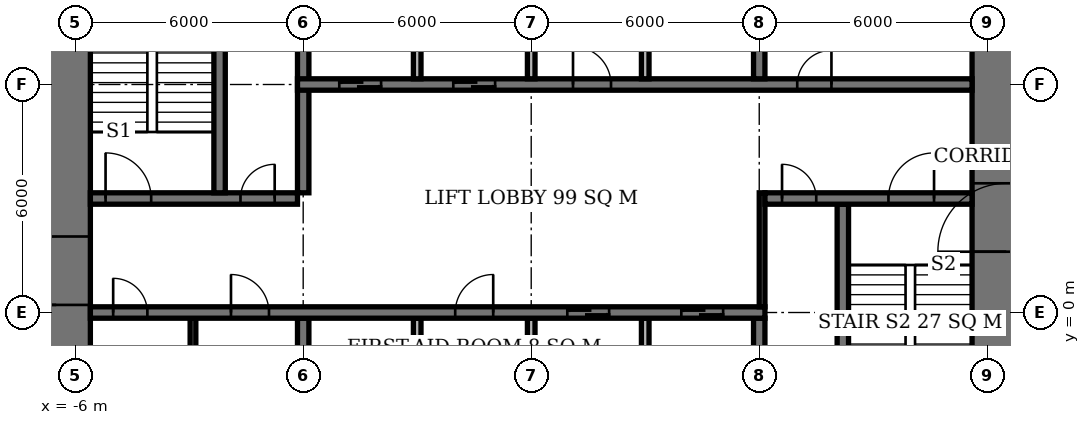
"""IFC4 building model, lengths in metres.
Left out: names, types, materials, properties, quantities, classifications, styles, units other than length and angle.
Written with IfcOpenShell. Run it as: python <this file> out.ifc"""

import sys

from ifc_helpers import new_model, si_unit, direction, frame, frame_2d, origin, place, context, subcontext, project, spatial, rectangle, extrude, element, fill, save


model = new_model("IFC4")
c1 = context("Model", 3, precision=1e-05, world=origin(), true_north=direction((0.0, 1.0)))
c2 = subcontext(c1, "Body", "Model", "MODEL_VIEW")
j1 = project(units=[si_unit("LENGTHUNIT", "METRE"), si_unit("PLANEANGLEUNIT", "RADIAN")], contexts=[c1])
p1 = place(None, origin())
s1 = spatial("IfcSite", under=j1, at=p1, CompositionType="ELEMENT")
p2 = place(p1, origin())
s2 = spatial("IfcBuilding", under=s1, at=p2, CompositionType="ELEMENT")
p3 = place(p2, frame((0.0, 0.0, 204.5)))
s3 = spatial("IfcBuildingStorey", under=s2, at=p3, CompositionType="ELEMENT", Elevation=204.5)
p4 = place(p3, frame((-6.5, -7.6, 0.0), z_axis=(0.0, 0.0, 1.0), x_axis=(0.0, 1.0, 0.0)))
e1 = element("IfcWall", 1, at=p4, inside=s3, PredefinedType="SHEAR", context=c2, shape_type="SweptSolid", body=[
    extrude(rectangle(XDim=21.2, YDim=1.8, at=frame_2d((10.6, 0.0))), origin(), (0.0, 0.0, 1.0), 3.9),
])
p5 = place(p4, frame((7.8, 0.0, 0.0)))
e2 = element("IfcOpeningElement", 2, at=p5, cuts=e1, PredefinedType="OPENING", context=c2, shape_type="SweptSolid", body=[
    extrude(rectangle(XDim=1.8, YDim=2.4, at=frame_2d((0.9, 1.2))), frame((0.0, 0.91, 0.0), z_axis=(0.0, -1.0, 0.0), x_axis=(1.0, 0.0, 0.0)), (0.0, 0.0, 1.0), 1.82),
])
p6 = place(p3, frame((18.5, -7.6, 0.0), z_axis=(0.0, 0.0, 1.0), x_axis=(0.0, 1.0, 0.0)))
e3 = element("IfcWall", 3, at=p6, inside=s3, PredefinedType="SHEAR", context=c2, shape_type="SweptSolid", body=[
    extrude(rectangle(XDim=21.2, YDim=1.8, at=frame_2d((10.6, 0.0))), origin(), (0.0, 0.0, 1.0), 3.9),
])
p7 = place(p6, frame((9.2, 0.0, 0.0)))
e4 = element("IfcOpeningElement", 4, at=p7, cuts=e3, PredefinedType="OPENING", context=c2, shape_type="SweptSolid", body=[
    extrude(rectangle(XDim=1.8, YDim=2.4, at=frame_2d((0.9, 1.2))), frame((0.0, 0.91, 0.0), z_axis=(0.0, -1.0, 0.0), x_axis=(1.0, 0.0, 0.0)), (0.0, 0.0, 1.0), 1.82),
])
p8 = place(p3, frame((-5.6, 0.0, 0.0), z_axis=(0.0, 0.0, 1.0), x_axis=(1.0, 0.0, 0.0)))
e5 = element("IfcWall", 5, at=p8, inside=s3, PredefinedType="SHEAR", context=c2, shape_type="SweptSolid", body=[
    extrude(rectangle(XDim=17.75, YDim=0.3, at=frame_2d((8.875, 0.0))), origin(), (0.0, 0.0, 1.0), 3.9),
])
p9 = place(p8, frame((0.6, 0.0, 0.0)))
e6 = element("IfcOpeningElement", 6, at=p9, cuts=e5, PredefinedType="OPENING", context=c2, shape_type="SweptSolid", body=[
    extrude(rectangle(XDim=0.9, YDim=2.1, at=frame_2d((0.45, 1.05))), frame((0.0, 0.16, 0.0), z_axis=(0.0, -1.0, 0.0), x_axis=(1.0, 0.0, 0.0)), (0.0, 0.0, 1.0), 0.32),
])
p10 = place(p8, frame((3.7, 0.0, 0.0)))
e7 = element("IfcOpeningElement", 7, at=p10, cuts=e5, PredefinedType="OPENING", context=c2, shape_type="SweptSolid", body=[
    extrude(rectangle(XDim=1.0, YDim=2.1, at=frame_2d((0.5, 1.05))), frame((0.0, 0.16, 0.0), z_axis=(0.0, -1.0, 0.0), x_axis=(1.0, 0.0, 0.0)), (0.0, 0.0, 1.0), 0.32),
])
p11 = place(p8, frame((9.6, 0.0, 0.0)))
e8 = element("IfcOpeningElement", 8, at=p11, cuts=e5, PredefinedType="OPENING", context=c2, shape_type="SweptSolid", body=[
    extrude(rectangle(XDim=1.0, YDim=2.1, at=frame_2d((0.5, 1.05))), frame((0.0, 0.16, 0.0), z_axis=(0.0, -1.0, 0.0), x_axis=(1.0, 0.0, 0.0)), (0.0, 0.0, 1.0), 0.32),
])
p12 = place(p8, frame((12.55, 0.0, 0.0)))
e9 = element("IfcOpeningElement", 9, at=p12, cuts=e5, PredefinedType="OPENING", context=c2, shape_type="SweptSolid", body=[
    extrude(rectangle(XDim=1.1, YDim=2.1, at=frame_2d((0.55, 1.05))), frame((0.0, 0.16, 0.0), z_axis=(0.0, -1.0, 0.0), x_axis=(1.0, 0.0, 0.0)), (0.0, 0.0, 1.0), 0.32),
])
p13 = place(p8, frame((15.55, 0.0, 0.0)))
e10 = element("IfcOpeningElement", 10, at=p13, cuts=e5, PredefinedType="OPENING", context=c2, shape_type="SweptSolid", body=[
    extrude(rectangle(XDim=1.1, YDim=2.1, at=frame_2d((0.55, 1.05))), frame((0.0, 0.16, 0.0), z_axis=(0.0, -1.0, 0.0), x_axis=(1.0, 0.0, 0.0)), (0.0, 0.0, 1.0), 0.32),
])
p14 = place(p3, frame((-5.6, 3.0, 0.0), z_axis=(0.0, 0.0, 1.0), x_axis=(1.0, 0.0, 0.0)))
e11 = element("IfcWall", 11, at=p14, inside=s3, PredefinedType="SHEAR", context=c2, shape_type="SweptSolid", body=[
    extrude(rectangle(XDim=5.45, YDim=0.3, at=frame_2d((2.725, 0.0))), origin(), (0.0, 0.0, 1.0), 3.9),
])
p15 = place(p14, frame((0.4, 0.0, 0.0)))
e12 = element("IfcOpeningElement", 12, at=p15, cuts=e11, PredefinedType="OPENING", context=c2, shape_type="SweptSolid", body=[
    extrude(rectangle(XDim=1.2, YDim=2.1, at=frame_2d((0.6, 1.05))), frame((0.0, 0.16, 0.0), z_axis=(0.0, -1.0, 0.0), x_axis=(1.0, 0.0, 0.0)), (0.0, 0.0, 1.0), 0.32),
])
p16 = place(p14, frame((3.95, 0.0, 0.0)))
e13 = element("IfcOpeningElement", 13, at=p16, cuts=e11, PredefinedType="OPENING", context=c2, shape_type="SweptSolid", body=[
    extrude(rectangle(XDim=0.9, YDim=2.1, at=frame_2d((0.45, 1.05))), frame((0.0, 0.16, 0.0), z_axis=(0.0, -1.0, 0.0), x_axis=(1.0, 0.0, 0.0)), (0.0, 0.0, 1.0), 0.32),
])
p17 = place(p3, frame((12.15, 3.0, 0.0), z_axis=(0.0, 0.0, 1.0), x_axis=(1.0, 0.0, 0.0)))
e14 = element("IfcWall", 14, at=p17, inside=s3, PredefinedType="SHEAR", context=c2, shape_type="SweptSolid", body=[
    extrude(rectangle(XDim=5.45, YDim=0.3, at=frame_2d((2.725, 0.0))), origin(), (0.0, 0.0, 1.0), 3.9),
])
p18 = place(p17, frame((3.25, 0.0, 0.0)))
e15 = element("IfcOpeningElement", 15, at=p18, cuts=e14, PredefinedType="OPENING", context=c2, shape_type="SweptSolid", body=[
    extrude(rectangle(XDim=1.2, YDim=2.1, at=frame_2d((0.6, 1.05))), frame((0.0, 0.16, 0.0), z_axis=(0.0, -1.0, 0.0), x_axis=(1.0, 0.0, 0.0)), (0.0, 0.0, 1.0), 0.32),
])
p19 = place(p17, frame((0.45, 0.0, 0.0)))
e16 = element("IfcOpeningElement", 16, at=p19, cuts=e14, PredefinedType="OPENING", context=c2, shape_type="SweptSolid", body=[
    extrude(rectangle(XDim=0.9, YDim=2.1, at=frame_2d((0.45, 1.05))), frame((0.0, 0.16, 0.0), z_axis=(0.0, -1.0, 0.0), x_axis=(1.0, 0.0, 0.0)), (0.0, 0.0, 1.0), 0.32),
])
p20 = place(p3, frame((-0.15, 6.0, 0.0), z_axis=(0.0, 0.0, 1.0), x_axis=(1.0, 0.0, 0.0)))
e17 = element("IfcWall", 17, at=p20, inside=s3, PredefinedType="SHEAR", context=c2, shape_type="SweptSolid", body=[
    extrude(rectangle(XDim=17.75, YDim=0.3, at=frame_2d((8.875, 0.0))), origin(), (0.0, 0.0, 1.0), 3.9),
])
p21 = place(p20, frame((13.15, 0.0, 0.0)))
e18 = element("IfcOpeningElement", 18, at=p21, cuts=e17, PredefinedType="OPENING", context=c2, shape_type="SweptSolid", body=[
    extrude(rectangle(XDim=0.9, YDim=2.1, at=frame_2d((0.45, 1.05))), frame((0.0, 0.16, 0.0), z_axis=(0.0, -1.0, 0.0), x_axis=(1.0, 0.0, 0.0)), (0.0, 0.0, 1.0), 0.32),
])
p22 = place(p20, frame((7.25, 0.0, 0.0)))
e19 = element("IfcOpeningElement", 19, at=p22, cuts=e17, PredefinedType="OPENING", context=c2, shape_type="SweptSolid", body=[
    extrude(rectangle(XDim=1.0, YDim=2.1, at=frame_2d((0.5, 1.05))), frame((0.0, 0.16, 0.0), z_axis=(0.0, -1.0, 0.0), x_axis=(1.0, 0.0, 0.0)), (0.0, 0.0, 1.0), 0.32),
])
p23 = place(p20, frame((1.1, 0.0, 0.0)))
e20 = element("IfcOpeningElement", 20, at=p23, cuts=e17, PredefinedType="OPENING", context=c2, shape_type="SweptSolid", body=[
    extrude(rectangle(XDim=1.1, YDim=2.1, at=frame_2d((0.55, 1.05))), frame((0.0, 0.16, 0.0), z_axis=(0.0, -1.0, 0.0), x_axis=(1.0, 0.0, 0.0)), (0.0, 0.0, 1.0), 0.32),
])
p24 = place(p20, frame((4.1, 0.0, 0.0)))
e21 = element("IfcOpeningElement", 21, at=p24, cuts=e17, PredefinedType="OPENING", context=c2, shape_type="SweptSolid", body=[
    extrude(rectangle(XDim=1.1, YDim=2.1, at=frame_2d((0.55, 1.05))), frame((0.0, 0.16, 0.0), z_axis=(0.0, -1.0, 0.0), x_axis=(1.0, 0.0, 0.0)), (0.0, 0.0, 1.0), 0.32),
])
p25 = place(p3, frame((0.0, -5.6, 0.0), z_axis=(0.0, 0.0, 1.0), x_axis=(0.0, 1.0, 0.0)))
e22 = element("IfcWall", 22, at=p25, inside=s3, PredefinedType="SHEAR", context=c2, shape_type="SweptSolid", body=[
    extrude(rectangle(XDim=5.45, YDim=0.3, at=frame_2d((2.725, 0.0))), origin(), (0.0, 0.0, 1.0), 3.9),
])
p26 = place(p3, frame((0.0, 3.15, 0.0), z_axis=(0.0, 0.0, 1.0), x_axis=(0.0, 1.0, 0.0)))
e23 = element("IfcWall", 23, at=p26, inside=s3, PredefinedType="SHEAR", context=c2, shape_type="SweptSolid", body=[
    extrude(rectangle(XDim=8.45, YDim=0.3, at=frame_2d((4.225, 0.0))), origin(), (0.0, 0.0, 1.0), 3.9),
])
for number, where, z_axis, x_axis in (
    (24, (12.0, -5.6, 0.0), (0.0, 0.0, 1.0), (0.0, 1.0, 0.0)),
    (25, (12.0, 6.15, 0.0), (0.0, 0.0, 1.0), (0.0, 1.0, 0.0)),
):
    element("IfcWall", number, at=place(p3, frame(where, z_axis=z_axis, x_axis=x_axis)), inside=s3, PredefinedType="SHEAR", context=c2, shape_type="SweptSolid", body=[
        extrude(rectangle(XDim=5.45, YDim=0.3, at=frame_2d((2.725, 0.0))), origin(), (0.0, 0.0, 1.0), 3.9),
    ])
for number, where, z_axis, x_axis in (
    (26, (-2.2, 3.15, 0.0), (0.0, 0.0, 1.0), (0.0, 1.0, 0.0)),
    (27, (14.2, -5.6, 0.0), (0.0, 0.0, 1.0), (0.0, 1.0, 0.0)),
):
    element("IfcWall", number, at=place(p3, frame(where, z_axis=z_axis, x_axis=x_axis)), inside=s3, PredefinedType="SHEAR", context=c2, shape_type="SweptSolid", body=[
        extrude(rectangle(XDim=8.45, YDim=0.3, at=frame_2d((4.225, 0.0))), origin(), (0.0, 0.0, 1.0), 3.9),
    ])
for number, where, z_axis, x_axis in (
    (28, (3.0, 6.15, 0.0), (0.0, 0.0, 1.0), (0.0, 1.0, 0.0)),
    (29, (6.0, 6.15, 0.0), (0.0, 0.0, 1.0), (0.0, 1.0, 0.0)),
    (30, (9.0, 6.15, 0.0), (0.0, 0.0, 1.0), (0.0, 1.0, 0.0)),
    (31, (3.0, -5.6, 0.0), (0.0, 0.0, 1.0), (0.0, 1.0, 0.0)),
    (32, (6.0, -5.6, 0.0), (0.0, 0.0, 1.0), (0.0, 1.0, 0.0)),
    (33, (9.0, -5.6, 0.0), (0.0, 0.0, 1.0), (0.0, 1.0, 0.0)),
):
    element("IfcWall", number, at=place(p3, frame(where, z_axis=z_axis, x_axis=x_axis)), inside=s3, PredefinedType="SOLIDWALL", context=c2, shape_type="SweptSolid", body=[
        extrude(rectangle(XDim=5.45, YDim=0.2, at=frame_2d((2.725, 0.0))), origin(), (0.0, 0.0, 1.0), 3.9),
    ])
p27 = place(p3, frame((-2.9, -5.6, 0.0), z_axis=(0.0, 0.0, 1.0), x_axis=(0.0, 1.0, 0.0)))
e34 = element("IfcWall", 34, at=p27, inside=s3, PredefinedType="PLUMBINGWALL", context=c2, shape_type="SweptSolid", body=[
    extrude(rectangle(XDim=5.45, YDim=0.15, at=frame_2d((2.725, 0.0))), origin(), (0.0, 0.0, 1.0), 3.65),
])
p28 = place(p3, frame((12.075, 0.15, 0.0), z_axis=(0.0, 0.0, 1.0), x_axis=(0.0, 1.0, 0.0)))
e35 = element("IfcWall", 35, at=p28, inside=s3, PredefinedType="PARTITIONING", context=c2, shape_type="SweptSolid", body=[
    extrude(rectangle(XDim=3.0, YDim=0.15, at=frame_2d((1.5, 0.0))), origin(), (0.0, 0.0, 1.0), 3.65),
])
p29 = place(p5, origin())
e36 = element("IfcDoor", 36, at=p29, inside=s3, OperationType="DOUBLE_DOOR_SINGLE_SWING", PredefinedType="DOOR", context=c2, shape_type="SweptSolid", body=[
    extrude(rectangle(XDim=1.8, YDim=2.4, at=frame_2d((0.9, 1.2))), frame((0.0, 0.025, 0.0), z_axis=(0.0, -1.0, 0.0), x_axis=(1.0, 0.0, 0.0)), (0.0, 0.0, 1.0), 0.05),
])
fill(e2, e36)
p30 = place(p7, origin())
e37 = element("IfcDoor", 37, at=p30, inside=s3, OperationType="DOUBLE_DOOR_SINGLE_SWING", PredefinedType="DOOR", context=c2, shape_type="SweptSolid", body=[
    extrude(rectangle(XDim=1.8, YDim=2.4, at=frame_2d((0.9, 1.2))), frame((0.0, 0.025, 0.0), z_axis=(0.0, -1.0, 0.0), x_axis=(1.0, 0.0, 0.0)), (0.0, 0.0, 1.0), 0.05),
])
fill(e4, e37)
p31 = place(p15, origin())
e38 = element("IfcDoor", 38, at=p31, inside=s3, OperationType="SINGLE_SWING_LEFT", PredefinedType="DOOR", context=c2, shape_type="SweptSolid", body=[
    extrude(rectangle(XDim=1.2, YDim=2.1, at=frame_2d((0.6, 1.05))), frame((0.0, 0.025, 0.0), z_axis=(0.0, -1.0, 0.0), x_axis=(1.0, 0.0, 0.0)), (0.0, 0.0, 1.0), 0.05),
])
fill(e12, e38)
p32 = place(p16, origin())
e39 = element("IfcDoor", 39, at=p32, inside=s3, OperationType="SINGLE_SWING_RIGHT", PredefinedType="DOOR", context=c2, shape_type="SweptSolid", body=[
    extrude(rectangle(XDim=0.9, YDim=2.1, at=frame_2d((0.45, 1.05))), frame((0.0, 0.025, 0.0), z_axis=(0.0, -1.0, 0.0), x_axis=(1.0, 0.0, 0.0)), (0.0, 0.0, 1.0), 0.05),
])
fill(e13, e39)
p33 = place(p18, origin())
e40 = element("IfcDoor", 40, at=p33, inside=s3, OperationType="SINGLE_SWING_RIGHT", PredefinedType="DOOR", context=c2, shape_type="SweptSolid", body=[
    extrude(rectangle(XDim=1.2, YDim=2.1, at=frame_2d((0.6, 1.05))), frame((0.0, 0.025, 0.0), z_axis=(0.0, -1.0, 0.0), x_axis=(1.0, 0.0, 0.0)), (0.0, 0.0, 1.0), 0.05),
])
fill(e15, e40)
p34 = place(p19, origin())
e41 = element("IfcDoor", 41, at=p34, inside=s3, OperationType="SINGLE_SWING_LEFT", PredefinedType="DOOR", context=c2, shape_type="SweptSolid", body=[
    extrude(rectangle(XDim=0.9, YDim=2.1, at=frame_2d((0.45, 1.05))), frame((0.0, 0.025, 0.0), z_axis=(0.0, -1.0, 0.0), x_axis=(1.0, 0.0, 0.0)), (0.0, 0.0, 1.0), 0.05),
])
fill(e16, e41)
p35 = place(p9, origin())
e42 = element("IfcDoor", 42, at=p35, inside=s3, OperationType="SINGLE_SWING_LEFT", PredefinedType="DOOR", context=c2, shape_type="SweptSolid", body=[
    extrude(rectangle(XDim=0.9, YDim=2.1, at=frame_2d((0.45, 1.05))), frame((0.0, 0.025, 0.0), z_axis=(0.0, -1.0, 0.0), x_axis=(1.0, 0.0, 0.0)), (0.0, 0.0, 1.0), 0.05),
])
fill(e6, e42)
p36 = place(p10, origin())
e43 = element("IfcDoor", 43, at=p36, inside=s3, OperationType="SINGLE_SWING_LEFT", PredefinedType="DOOR", context=c2, shape_type="SweptSolid", body=[
    extrude(rectangle(XDim=1.0, YDim=2.1, at=frame_2d((0.5, 1.05))), frame((0.0, 0.025, 0.0), z_axis=(0.0, -1.0, 0.0), x_axis=(1.0, 0.0, 0.0)), (0.0, 0.0, 1.0), 0.05),
])
fill(e7, e43)
p37 = place(p21, origin())
e44 = element("IfcDoor", 44, at=p37, inside=s3, OperationType="SINGLE_SWING_RIGHT", PredefinedType="DOOR", context=c2, shape_type="SweptSolid", body=[
    extrude(rectangle(XDim=0.9, YDim=2.1, at=frame_2d((0.45, 1.05))), frame((0.0, 0.025, 0.0), z_axis=(0.0, -1.0, 0.0), x_axis=(1.0, 0.0, 0.0)), (0.0, 0.0, 1.0), 0.05),
])
fill(e18, e44)
p38 = place(p22, origin())
e45 = element("IfcDoor", 45, at=p38, inside=s3, OperationType="SINGLE_SWING_LEFT", PredefinedType="DOOR", context=c2, shape_type="SweptSolid", body=[
    extrude(rectangle(XDim=1.0, YDim=2.1, at=frame_2d((0.5, 1.05))), frame((0.0, 0.025, 0.0), z_axis=(0.0, -1.0, 0.0), x_axis=(1.0, 0.0, 0.0)), (0.0, 0.0, 1.0), 0.05),
])
fill(e19, e45)
p39 = place(p11, origin())
e46 = element("IfcDoor", 46, at=p39, inside=s3, OperationType="SINGLE_SWING_RIGHT", PredefinedType="DOOR", context=c2, shape_type="SweptSolid", body=[
    extrude(rectangle(XDim=1.0, YDim=2.1, at=frame_2d((0.5, 1.05))), frame((0.0, 0.025, 0.0), z_axis=(0.0, -1.0, 0.0), x_axis=(1.0, 0.0, 0.0)), (0.0, 0.0, 1.0), 0.05),
])
fill(e8, e46)
p40 = place(p23, origin())
e47 = element("IfcDoor", 47, at=p40, inside=s3, OperationType="DOUBLE_DOOR_SLIDING", PredefinedType="USERDEFINED", context=c2, shape_type="SweptSolid", body=[
    extrude(rectangle(XDim=1.1, YDim=2.1, at=frame_2d((0.55, 1.05))), frame((0.0, 0.025, 0.0), z_axis=(0.0, -1.0, 0.0), x_axis=(1.0, 0.0, 0.0)), (0.0, 0.0, 1.0), 0.05),
])
fill(e20, e47)
p41 = place(p24, origin())
e48 = element("IfcDoor", 48, at=p41, inside=s3, OperationType="DOUBLE_DOOR_SLIDING", PredefinedType="USERDEFINED", context=c2, shape_type="SweptSolid", body=[
    extrude(rectangle(XDim=1.1, YDim=2.1, at=frame_2d((0.55, 1.05))), frame((0.0, 0.025, 0.0), z_axis=(0.0, -1.0, 0.0), x_axis=(1.0, 0.0, 0.0)), (0.0, 0.0, 1.0), 0.05),
])
fill(e21, e48)
p42 = place(p12, origin())
e49 = element("IfcDoor", 49, at=p42, inside=s3, OperationType="DOUBLE_DOOR_SLIDING", PredefinedType="USERDEFINED", context=c2, shape_type="SweptSolid", body=[
    extrude(rectangle(XDim=1.1, YDim=2.1, at=frame_2d((0.55, 1.05))), frame((0.0, 0.025, 0.0), z_axis=(0.0, -1.0, 0.0), x_axis=(1.0, 0.0, 0.0)), (0.0, 0.0, 1.0), 0.05),
])
fill(e9, e49)
p43 = place(p13, origin())
e50 = element("IfcDoor", 50, at=p43, inside=s3, OperationType="DOUBLE_DOOR_SLIDING", PredefinedType="USERDEFINED", context=c2, shape_type="SweptSolid", body=[
    extrude(rectangle(XDim=1.1, YDim=2.1, at=frame_2d((0.55, 1.05))), frame((0.0, 0.025, 0.0), z_axis=(0.0, -1.0, 0.0), x_axis=(1.0, 0.0, 0.0)), (0.0, 0.0, 1.0), 0.05),
])
fill(e10, e50)
save(model, sys.argv[1])
